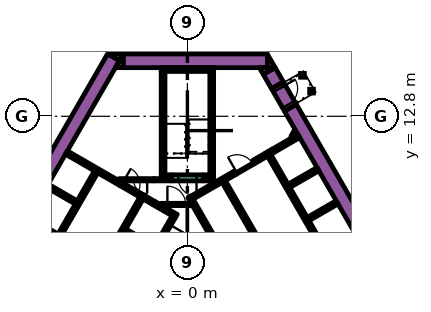
"""IFC4 building model, lengths in metres.
Left out: names, types, materials, properties, quantities, classifications, styles, units other than length and angle.
Written with IfcOpenShell. Run it as: python <this file> out.ifc"""

import sys

from ifc_helpers import new_model, si_unit, direction, frame, frame_2d, origin, origin_2d, place, context, subcontext, project, spatial, polyline, rectangle, outline, extrude, element, fill, save


model = new_model("IFC4")
c1 = context("Model", 3, precision=1e-05, world=origin(), true_north=direction((0.0, 1.0)))
c2 = subcontext(c1, "Body", "Model", "MODEL_VIEW")
j1 = project(units=[si_unit("LENGTHUNIT", "METRE"), si_unit("PLANEANGLEUNIT", "RADIAN")], contexts=[c1])
p1 = place(None, origin())
s1 = spatial("IfcSite", under=j1, at=p1, CompositionType="ELEMENT")
p2 = place(p1, origin())
s2 = spatial("IfcBuilding", under=s1, at=p2, CompositionType="ELEMENT")
p3 = place(p2, frame((0.0, 0.0, 6.0)))
s3 = spatial("IfcBuildingStorey", under=s2, at=p3, CompositionType="ELEMENT", Elevation=6.0)
p4 = place(p3, frame((6.776, 13.364, 0.0), z_axis=(0.0, 0.0, 1.0), x_axis=(0.500004177138, -0.8660229921, 0.0)))
e1 = element("IfcWall", 1, at=p4, inside=s3, PredefinedType="SOLIDWALL", context=c2, shape_type="SweptSolid", body=[
    extrude(rectangle(XDim=20.204, YDim=0.9, at=frame_2d((10.102, 0.0))), origin(), (0.0, 0.0, 1.0), 5.4),
])
p5 = place(p3, frame((-15.36, -1.503, 0.0), z_axis=(0.0, 0.0, 1.0), x_axis=(0.50000389221, 0.866023156604, 0.0)))
e2 = element("IfcWall", 2, at=p5, inside=s3, PredefinedType="SOLIDWALL", context=c2, shape_type="SweptSolid", body=[
    extrude(rectangle(XDim=21.0, YDim=0.9, at=frame_2d((10.5, 0.0))), origin(), (0.0, 0.0, 1.0), 5.4),
])
p6 = place(p3, origin())
e3 = element("IfcWall", 3, at=p6, inside=s3, PredefinedType="SOLIDWALL", context=c2, shape_type="SweptSolid", body=[
    extrude(outline(polyline([(-4.215, 16.9), (-4.469, 16.46), (-5.231, 16.9), (-4.215, 16.9)])), origin(), (0.0, 0.0, 1.0), 5.4),
])
p7 = place(p3, frame((-4.224, 16.45, 0.0), z_axis=(0.0, 0.0, 1.0), x_axis=(1.0, 0.0, 0.0)))
e4 = element("IfcWall", 4, at=p7, inside=s3, PredefinedType="SOLIDWALL", context=c2, shape_type="SweptSolid", body=[
    extrude(rectangle(XDim=9.488, YDim=0.9, at=frame_2d((4.744, 0.0))), origin(), (0.0, 0.0, 1.0), 5.4),
])
e5 = element("IfcWall", 5, at=p6, inside=s3, PredefinedType="SOLIDWALL", context=c2, shape_type="SweptSolid", body=[
    extrude(outline(polyline([(5.265, 16.0), (5.265, 16.88), (5.773, 16.0), (5.265, 16.0)])), origin(), (0.0, 0.0, 1.0), 5.4),
])
e6 = element("IfcWall", 6, at=p6, inside=s3, PredefinedType="SOLIDWALL", context=c2, shape_type="SweptSolid", body=[
    extrude(outline(polyline([(-4.734, 16.0), (-4.226, 16.88), (-4.226, 16.0), (-4.734, 16.0)])), origin(), (0.0, 0.0, 1.0), 5.4),
])
p8 = place(p3, frame((5.926, 14.836, 0.0), z_axis=(0.0, 0.0, 1.0), x_axis=(-0.500076735116, 0.865981096212, 0.0)))
e7 = element("IfcWall", 7, at=p8, inside=s3, PredefinedType="SOLIDWALL", context=c2, shape_type="SweptSolid", body=[
    extrude(rectangle(XDim=1.094, YDim=0.9, at=frame_2d((0.547, 0.0))), origin(), (0.0, 0.0, 1.0), 5.4),
])
e8 = element("IfcWall", 8, at=p6, inside=s3, PredefinedType="SOLIDWALL", context=c2, shape_type="SweptSolid", body=[
    extrude(outline(polyline([(4.734, 16.0), (5.75, 16.0), (4.988, 15.56), (4.734, 16.0)])), origin(), (0.0, 0.0, 1.0), 5.4),
])
p9 = place(p3, frame((-1.725, 15.875, 0.0), z_axis=(0.0, 0.0, 1.0), x_axis=(1.0, 0.0, 0.0)))
e9 = element("IfcWall", 9, at=p9, inside=s3, PredefinedType="SOLIDWALL", context=c2, shape_type="SweptSolid", body=[
    extrude(rectangle(XDim=3.45, YDim=0.25, at=frame_2d((1.725, 0.0))), origin(), (0.0, 0.0, 1.0), 5.4),
])
p10 = place(p3, frame((1.6, 8.95, 0.0), z_axis=(0.0, 0.0, 1.0), x_axis=(0.0, 1.0, 0.0)))
e10 = element("IfcWall", 10, at=p10, inside=s3, PredefinedType="SOLIDWALL", context=c2, shape_type="SweptSolid", body=[
    extrude(rectangle(XDim=6.8, YDim=0.25, at=frame_2d((3.4, 0.0))), origin(), (0.0, 0.0, 1.0), 5.4),
])
p11 = place(p3, frame((1.05, 8.825, 0.0), z_axis=(0.0, 0.0, 1.0), x_axis=(1.0, 0.0, 0.0)))
e11 = element("IfcWall", 11, at=p11, inside=s3, PredefinedType="SOLIDWALL", context=c2, shape_type="SweptSolid", body=[
    extrude(rectangle(XDim=0.675, YDim=0.25, at=frame_2d((0.337, 0.0))), origin(), (0.0, 0.0, 1.0), 5.4),
])
p12 = place(p3, frame((-1.6, 8.7, 0.0), z_axis=(0.0, 0.0, 1.0), x_axis=(0.0, 1.0, 0.0)))
e12 = element("IfcWall", 12, at=p12, inside=s3, PredefinedType="SOLIDWALL", context=c2, shape_type="SweptSolid", body=[
    extrude(rectangle(XDim=7.05, YDim=0.25, at=frame_2d((3.525, 0.0))), origin(), (0.0, 0.0, 1.0), 5.4),
])
p13 = place(p3, frame((-1.475, 8.825, 0.0), z_axis=(0.0, 0.0, 1.0), x_axis=(1.0, 0.0, 0.0)))
e13 = element("IfcWall", 13, at=p13, inside=s3, PredefinedType="SOLIDWALL", context=c2, shape_type="SweptSolid", body=[
    extrude(rectangle(XDim=0.425, YDim=0.25, at=frame_2d((0.212, 0.0))), origin(), (0.0, 0.0, 1.0), 5.4),
])
p14 = place(p3, frame((11.678, -0.677, 0.0), z_axis=(0.0, 0.0, 1.0), x_axis=(-0.500003135297, 0.866023593612, 0.0)))
e14 = element("IfcWall", 14, at=p14, inside=s3, PredefinedType="SOLIDWALL", context=c2, shape_type="SweptSolid", body=[
    extrude(rectangle(XDim=12.85, YDim=0.25, at=frame_2d((6.425, 0.0))), origin(), (0.0, 0.0, 1.0), 5.4),
])
e15 = element("IfcWall", 15, at=p6, inside=s3, PredefinedType="SOLIDWALL", context=c2, shape_type="SweptSolid", body=[
    extrude(outline(polyline([(6.552, -3.348), (6.677, -3.564), (6.46, -3.689), (4.897, -0.981), (0.332, 6.925), (0.335, 6.925), (0.335, 6.925), (0.335, 6.925), (0.335, 7.075), (0.335, 7.075), (0.335, 7.075), (0.245, 7.075), (0.079, 7.363), (0.035, 7.439), (0.252, 7.564), (0.377, 7.348), (6.552, -3.348)])), origin(), (0.0, 0.0, 1.0), 5.4),
])
p15 = place(p3, frame((4.358, 9.791, 0.0), z_axis=(0.0, 0.0, 1.0), x_axis=(0.866100000774, 0.49987077196, 0.0)))
e16 = element("IfcWall", 16, at=p15, inside=s3, PredefinedType="SOLIDWALL", context=c2, shape_type="SweptSolid", body=[
    extrude(rectangle(XDim=0.95, YDim=0.25, at=frame_2d((0.475, 0.0))), origin(), (0.0, 0.0, 1.0), 5.4),
])
p16 = place(p3, frame((0.314, 7.456, 0.0), z_axis=(0.0, 0.0, 1.0), x_axis=(0.866013897511, 0.50001992892, 0.0)))
e17 = element("IfcWall", 17, at=p16, inside=s3, PredefinedType="SOLIDWALL", context=c2, shape_type="SweptSolid", body=[
    extrude(rectangle(XDim=3.268, YDim=0.25, at=frame_2d((1.634, 0.0))), origin(), (0.0, 0.0, 1.0), 5.4),
])
p17 = place(p3, frame((5.469, 10.577, 0.0), z_axis=(0.0, 0.0, 1.0), x_axis=(0.499919672301, -0.866071776036, 0.0)))
e18 = element("IfcWall", 18, at=p17, inside=s3, PredefinedType="SOLIDWALL", context=c2, shape_type="SweptSolid", body=[
    extrude(rectangle(XDim=0.25, YDim=0.25, at=frame_2d((0.125, 0.0))), origin(), (0.0, 0.0, 1.0), 5.4),
])
p18 = place(p3, frame((5.64, 10.531, 0.0), z_axis=(0.0, 0.0, 1.0), x_axis=(0.866000020948, 0.500043961785, 0.0)))
e19 = element("IfcWall", 19, at=p18, inside=s3, PredefinedType="SOLIDWALL", context=c2, shape_type="SweptSolid", body=[
    extrude(rectangle(XDim=1.95, YDim=0.25, at=frame_2d((0.975, 0.0))), origin(), (0.0, 0.0, 1.0), 5.4),
])
for number, where, z_axis, x_axis in (
    (20, (8.589, 9.323, 0.0), (0.0, 0.0, 1.0), (-0.866, -0.5, 0.0)),
    (21, (7.944, 6.041, 0.0), (0.0, 0.0, 1.0), (0.866, 0.5, 0.0)),
):
    element("IfcWall", number, at=place(p3, frame(where, z_axis=z_axis, x_axis=x_axis)), inside=s3, PredefinedType="SOLIDWALL", context=c2, shape_type="SweptSolid", body=[
        extrude(rectangle(XDim=2.2, YDim=0.25, at=frame_2d((1.1, 0.0))), origin(), (0.0, 0.0, 1.0), 5.4),
    ])
p19 = place(p3, frame((-8.06, -1.311, 0.0), z_axis=(0.0, 0.0, 1.0), x_axis=(0.50000273126, 0.866023826885, 0.0)))
e22 = element("IfcWall", 22, at=p19, inside=s3, PredefinedType="SOLIDWALL", context=c2, shape_type="SweptSolid", body=[
    extrude(rectangle(XDim=10.33, YDim=0.25, at=frame_2d((5.165, 0.0))), origin(), (0.0, 0.0, 1.0), 5.4),
])
p20 = place(p3, frame((-1.819, 6.87, 0.0), z_axis=(0.0, 0.0, 1.0), x_axis=(-0.866294599386, 0.499533449405, 0.0)))
e23 = element("IfcWall", 23, at=p20, inside=s3, PredefinedType="SOLIDWALL", context=c2, shape_type="SweptSolid", body=[
    extrude(rectangle(XDim=0.41, YDim=0.25, at=frame_2d((0.205, 0.0))), origin(), (0.0, 0.0, 1.0), 5.4),
])
p21 = place(p3, frame((-2.849, 7.465, 0.0), z_axis=(0.0, 0.0, 1.0), x_axis=(0.865955664968, -0.500120771724, 0.0)))
e24 = element("IfcWall", 24, at=p21, inside=s3, PredefinedType="SOLIDWALL", context=c2, shape_type="SweptSolid", body=[
    extrude(rectangle(XDim=0.778, YDim=0.25, at=frame_2d((0.389, 0.0))), origin(), (0.0, 0.0, 1.0), 5.4),
])
p22 = place(p3, frame((-0.728, 6.24, 0.0), z_axis=(0.0, 0.0, 1.0), x_axis=(-0.866002680491, 0.500039355833, 0.0)))
e25 = element("IfcWall", 25, at=p22, inside=s3, PredefinedType="SOLIDWALL", context=c2, shape_type="SweptSolid", body=[
    extrude(rectangle(XDim=1.178, YDim=0.25, at=frame_2d((0.589, 0.0))), origin(), (0.0, 0.0, 1.0), 5.4),
])
p23 = place(p3, frame((-2.204, 4.182, 0.0), z_axis=(0.0, 0.0, 1.0), x_axis=(-0.866008176907, 0.50002983664, 0.0)))
e26 = element("IfcWall", 26, at=p23, inside=s3, PredefinedType="SOLIDWALL", context=c2, shape_type="SweptSolid", body=[
    extrude(rectangle(XDim=2.2, YDim=0.25, at=frame_2d((1.1, 0.0))), origin(), (0.0, 0.0, 1.0), 5.4),
])
e27 = element("IfcWall", 27, at=p6, inside=s3, PredefinedType="SOLIDWALL", context=c2, shape_type="SweptSolid", body=[
    extrude(outline(polyline([(-3.128, 7.481), (-3.259, 7.557), (-3.134, 7.773), (-3.003, 7.698), (-3.128, 7.481)])), origin(), (0.0, 0.0, 1.0), 5.4),
])
for number, where, z_axis, x_axis in (
    (28, (-8.574, 4.95, 0.0), (0.0, 0.0, 1.0), (-0.866, 0.5, 0.0)),
    (29, (-7.314, 7.132, 0.0), (0.0, 0.0, 1.0), (-0.866, 0.5, 0.0)),
):
    element("IfcWall", number, at=place(p3, frame(where, z_axis=z_axis, x_axis=x_axis)), inside=s3, PredefinedType="SOLIDWALL", context=c2, shape_type="SweptSolid", body=[
        extrude(rectangle(XDim=2.2, YDim=0.25, at=frame_2d((1.1, 0.0))), origin(), (0.0, 0.0, 1.0), 5.4),
    ])
p24 = place(p3, frame((-7.959, 10.415, 0.0), z_axis=(0.0, 0.0, 1.0), x_axis=(0.866020958405, -0.500007699544, 0.0)))
e30 = element("IfcWall", 30, at=p24, inside=s3, PredefinedType="SOLIDWALL", context=c2, shape_type="SweptSolid", body=[
    extrude(rectangle(XDim=4.1, YDim=0.25, at=frame_2d((2.05, 0.0))), origin(), (0.0, 0.0, 1.0), 5.4),
])
p25 = place(p3, frame((-3.997, 8.625, 0.0), z_axis=(0.0, 0.0, 1.0), x_axis=(-1.0, 0.0, 0.0)))
e31 = element("IfcWall", 31, at=p25, inside=s3, PredefinedType="PARTITIONING", context=c2, shape_type="SweptSolid", body=[
    extrude(rectangle(XDim=0.502, YDim=0.15, at=frame_2d((0.251, 0.0))), origin(), (0.0, 0.0, 1.0), 4.5),
])
p26 = place(p3, frame((-2.196, 8.625, 0.0), z_axis=(0.0, 0.0, 1.0), x_axis=(1.0, 0.0, 0.0)))
e32 = element("IfcWall", 32, at=p26, inside=s3, PredefinedType="PARTITIONING", context=c2, shape_type="SweptSolid", body=[
    extrude(rectangle(XDim=1.146, YDim=0.15, at=frame_2d((0.573, 0.0))), origin(), (0.0, 0.0, 1.0), 4.5),
])
p27 = place(p3, frame((1.05, 8.625, 0.0), z_axis=(0.0, 0.0, 1.0), x_axis=(1.0, 0.0, 0.0)))
e33 = element("IfcWall", 33, at=p27, inside=s3, PredefinedType="PARTITIONING", context=c2, shape_type="SweptSolid", body=[
    extrude(rectangle(XDim=0.514, YDim=0.15, at=frame_2d((0.257, 0.0))), origin(), (0.0, 0.0, 1.0), 4.5),
])
p28 = place(p3, frame((6.872, 11.45, 0.0), z_axis=(0.0, 0.0, 1.0), x_axis=(0.499846793097, 0.866113839764, 0.0)))
e34 = element("IfcWall", 34, at=p28, inside=s3, PredefinedType="PARTITIONING", context=c2, shape_type="SweptSolid", body=[
    extrude(rectangle(XDim=0.453, YDim=0.15, at=frame_2d((0.227, 0.0))), origin(), (0.0, 0.0, 1.0), 4.5),
])
p29 = place(p3, frame((7.131, 11.6, 0.0), z_axis=(0.0, 0.0, 1.0), x_axis=(0.498600033135, 0.866832167699, 0.0)))
e35 = element("IfcWall", 35, at=p29, inside=s3, PredefinedType="PARTITIONING", context=c2, shape_type="SweptSolid", body=[
    extrude(rectangle(XDim=0.107, YDim=0.15, at=frame_2d((0.053, 0.0))), origin(), (0.0, 0.0, 1.0), 4.5),
])
p30 = place(p3, frame((8.565, -2.185, 0.0), z_axis=(0.0, 0.0, 1.0), x_axis=(-0.499997954832, 0.866026584559, 0.0)))
e36 = element("IfcWall", 36, at=p30, inside=s3, PredefinedType="SOLIDWALL", context=c2, shape_type="SweptSolid", body=[
    extrude(rectangle(XDim=12.35, YDim=0.25, at=frame_2d((6.175, 0.0))), origin(), (0.0, 0.0, 1.0), 5.4),
])
p31 = place(p30, frame((5.725, 0.0, 0.0)))
e37 = element("IfcOpeningElement", 37, at=p31, cuts=e36, PredefinedType="OPENING", context=c2, shape_type="SweptSolid", body=[
    extrude(rectangle(XDim=0.9, YDim=2.1, at=frame_2d((0.45, 1.05))), frame((0.0, 0.135, 0.0), z_axis=(0.0, -1.0, 0.0), x_axis=(1.0, 0.0, 0.0)), (0.0, 0.0, 1.0), 0.27),
])
p32 = place(p3, frame((-6.008, 9.144, 0.0), z_axis=(0.0, 0.0, 1.0), x_axis=(-0.500006956611, -0.866021387346, 0.0)))
e38 = element("IfcWall", 38, at=p32, inside=s3, PredefinedType="SOLIDWALL", context=c2, shape_type="SweptSolid", body=[
    extrude(rectangle(XDim=9.83, YDim=0.25, at=frame_2d((4.915, 0.0))), origin(), (0.0, 0.0, 1.0), 5.4),
])
p33 = place(p32, frame((6.985, 0.0, 0.0)))
e39 = element("IfcOpeningElement", 39, at=p33, cuts=e38, PredefinedType="OPENING", context=c2, shape_type="SweptSolid", body=[
    extrude(rectangle(XDim=0.9, YDim=2.1, at=frame_2d((0.45, 1.05))), frame((0.0, 0.135, 0.0), z_axis=(0.0, -1.0, 0.0), x_axis=(1.0, 0.0, 0.0)), (0.0, 0.0, 1.0), 0.27),
])
p34 = place(p3, frame((-0.898, 6.194, 0.0), z_axis=(0.0, 0.0, 1.0), x_axis=(-0.499996202215, -0.866027596426, 0.0)))
e40 = element("IfcWall", 40, at=p34, inside=s3, PredefinedType="SOLIDWALL", context=c2, shape_type="SweptSolid", body=[
    extrude(rectangle(XDim=9.83, YDim=0.25, at=frame_2d((4.915, 0.0))), origin(), (0.0, 0.0, 1.0), 5.4),
])
p35 = place(p34, frame((0.585, 0.0, 0.0)))
e41 = element("IfcOpeningElement", 41, at=p35, cuts=e40, PredefinedType="OPENING", context=c2, shape_type="SweptSolid", body=[
    extrude(rectangle(XDim=1.1, YDim=2.1, at=frame_2d((0.55, 1.05))), frame((0.0, 0.135, 0.0), z_axis=(0.0, -1.0, 0.0), x_axis=(1.0, 0.0, 0.0)), (0.0, 0.0, 1.0), 0.27),
])
p36 = place(p34, frame((3.105, 0.0, 0.0)))
e42 = element("IfcOpeningElement", 42, at=p36, cuts=e40, PredefinedType="OPENING", context=c2, shape_type="SweptSolid", body=[
    extrude(rectangle(XDim=1.1, YDim=2.1, at=frame_2d((0.55, 1.05))), frame((0.0, 0.135, 0.0), z_axis=(0.0, -1.0, 0.0), x_axis=(1.0, 0.0, 0.0)), (0.0, 0.0, 1.0), 0.27),
])
p37 = place(p34, frame((5.625, 0.0, 0.0)))
e43 = element("IfcOpeningElement", 43, at=p37, cuts=e40, PredefinedType="OPENING", context=c2, shape_type="SweptSolid", body=[
    extrude(rectangle(XDim=1.1, YDim=2.1, at=frame_2d((0.55, 1.05))), frame((0.0, 0.135, 0.0), z_axis=(0.0, -1.0, 0.0), x_axis=(1.0, 0.0, 0.0)), (0.0, 0.0, 1.0), 0.27),
])
p38 = place(p34, frame((8.145, 0.0, 0.0)))
e44 = element("IfcOpeningElement", 44, at=p38, cuts=e40, PredefinedType="OPENING", context=c2, shape_type="SweptSolid", body=[
    extrude(rectangle(XDim=1.1, YDim=2.1, at=frame_2d((0.55, 1.05))), frame((0.0, 0.135, 0.0), z_axis=(0.0, -1.0, 0.0), x_axis=(1.0, 0.0, 0.0)), (0.0, 0.0, 1.0), 0.27),
])
p39 = place(p3, frame((1.05, 8.75, 0.0), z_axis=(0.0, 0.0, 1.0), x_axis=(-1.0, 0.0, 0.0)))
e45 = element("IfcWall", 45, at=p39, inside=s3, PredefinedType="SOLIDWALL", context=c2, shape_type="SweptSolid", body=[
    extrude(rectangle(XDim=2.1, YDim=0.4, at=frame_2d((1.05, 0.0))), origin(), (0.0, 0.0, 1.0), 5.4),
])
p40 = place(p39, frame((0.45, 0.0, 0.0)))
e46 = element("IfcOpeningElement", 46, at=p40, cuts=e45, PredefinedType="OPENING", context=c2, shape_type="SweptSolid", body=[
    extrude(rectangle(XDim=1.2, YDim=2.1, at=frame_2d((0.6, 1.05))), frame((0.0, 0.21, 0.0), z_axis=(0.0, -1.0, 0.0), x_axis=(1.0, 0.0, 0.0)), (0.0, 0.0, 1.0), 0.42),
])
p41 = place(p3, frame((-2.196, 8.625, 0.0), z_axis=(0.0, 0.0, 1.0), x_axis=(-1.0, 0.0, 0.0)))
e47 = element("IfcWall", 47, at=p41, inside=s3, PredefinedType="PARTITIONING", context=c2, shape_type="SweptSolid", body=[
    extrude(rectangle(XDim=1.8, YDim=0.15, at=frame_2d((0.9, 0.0))), origin(), (0.0, 0.0, 1.0), 4.5),
])
p42 = place(p41, frame((0.45, 0.0, 0.0)))
e48 = element("IfcOpeningElement", 48, at=p42, cuts=e47, PredefinedType="OPENING", context=c2, shape_type="SweptSolid", body=[
    extrude(rectangle(XDim=0.9, YDim=2.1, at=frame_2d((0.45, 1.05))), frame((0.0, 0.085, 0.0), z_axis=(0.0, -1.0, 0.0), x_axis=(1.0, 0.0, 0.0)), (0.0, 0.0, 1.0), 0.17),
])
p43 = place(p3, frame((-1.765, 7.0, 0.0), z_axis=(0.0, 0.0, 1.0), x_axis=(1.0, 0.0, 0.0)))
e49 = element("IfcWall", 49, at=p43, inside=s3, PredefinedType="PARTITIONING", context=c2, shape_type="SweptSolid", body=[
    extrude(rectangle(XDim=2.1, YDim=0.15, at=frame_2d((1.05, 0.0))), origin(), (0.0, 0.0, 1.0), 4.5),
])
p44 = place(p43, frame((0.45, 0.0, 0.0)))
e50 = element("IfcOpeningElement", 50, at=p44, cuts=e49, PredefinedType="OPENING", context=c2, shape_type="SweptSolid", body=[
    extrude(rectangle(XDim=1.2, YDim=2.1, at=frame_2d((0.6, 1.05))), frame((0.0, 0.085, 0.0), z_axis=(0.0, -1.0, 0.0), x_axis=(1.0, 0.0, 0.0)), (0.0, 0.0, 1.0), 0.17),
])
p45 = place(p3, frame((3.183, 9.02, 0.0), z_axis=(0.0, 0.0, 1.0), x_axis=(0.866034573852, 0.49998411664, 0.0)))
e51 = element("IfcWall", 51, at=p45, inside=s3, PredefinedType="PARTITIONING", context=c2, shape_type="SweptSolid", body=[
    extrude(rectangle(XDim=1.4, YDim=0.09, at=frame_2d((0.7, 0.0))), origin(), (0.0, 0.0, 1.0), 4.5),
])
p46 = place(p45, frame((0.1, 0.0, 0.0)))
e52 = element("IfcOpeningElement", 52, at=p46, cuts=e51, PredefinedType="OPENING", context=c2, shape_type="SweptSolid", body=[
    extrude(rectangle(XDim=1.2, YDim=2.1, at=frame_2d((0.6, 1.05))), frame((0.0, 0.055, 0.0), z_axis=(0.0, -1.0, 0.0), x_axis=(1.0, 0.0, 0.0)), (0.0, 0.0, 1.0), 0.11),
])
p47 = place(p3, frame((-4.409, 8.365, 0.0), z_axis=(0.0, 0.0, 1.0), x_axis=(0.866034573852, -0.49998411664, 0.0)))
e53 = element("IfcWall", 53, at=p47, inside=s3, PredefinedType="SOLIDWALL", context=c2, shape_type="SweptSolid", body=[
    extrude(rectangle(XDim=1.4, YDim=0.25, at=frame_2d((0.7, 0.0))), origin(), (0.0, 0.0, 1.0), 5.4),
])
p48 = place(p47, frame((0.1, 0.0, 0.0)))
e54 = element("IfcOpeningElement", 54, at=p48, cuts=e53, PredefinedType="OPENING", context=c2, shape_type="SweptSolid", body=[
    extrude(rectangle(XDim=1.2, YDim=2.1, at=frame_2d((0.6, 1.05))), frame((0.0, 0.135, 0.0), z_axis=(0.0, -1.0, 0.0), x_axis=(1.0, 0.0, 0.0)), (0.0, 0.0, 1.0), 0.27),
])
p49 = place(p3, frame((5.926, 14.836, 0.0), z_axis=(0.0, 0.0, 1.0), x_axis=(0.500062241894, -0.865989465428, 0.0)))
e55 = element("IfcWall", 55, at=p49, inside=s3, PredefinedType="SOLIDWALL", context=c2, shape_type="SweptSolid", body=[
    extrude(rectangle(XDim=1.7, YDim=0.9, at=frame_2d((0.85, 0.0))), origin(), (0.0, 0.0, 1.0), 5.4),
])
p50 = place(p49, frame((0.25, 0.0, 0.0)))
e56 = element("IfcOpeningElement", 56, at=p50, cuts=e55, PredefinedType="OPENING", context=c2, shape_type="SweptSolid", body=[
    extrude(rectangle(XDim=1.2, YDim=2.1, at=frame_2d((0.6, 1.05))), frame((0.0, 0.46, 0.0), z_axis=(0.0, -1.0, 0.0), x_axis=(1.0, 0.0, 0.0)), (0.0, 0.0, 1.0), 0.92),
])
for number, where, z_axis, x_axis in (
    (57, (8.167, 14.455, 0.0), (0.0, 0.0, 1.0), (1.0, 0.0, 0.0)),
    (58, (7.566, 15.495, 0.0), (0.0, 0.0, 1.0), (1.0, 0.0, 0.0)),
):
    element("IfcColumn", number, at=place(p3, frame(where, z_axis=z_axis, x_axis=x_axis)), inside=s3, PredefinedType="COLUMN", context=c2, shape_type="SweptSolid", body=[
        extrude(rectangle(XDim=0.25, YDim=0.25, at=origin_2d()), origin(), (0.0, 0.0, 1.0), 5.2),
    ])
p51 = place(p35, origin())
e59 = element("IfcDoor", 59, at=p51, inside=s3, OperationType="DOUBLE_DOOR_SLIDING", PredefinedType="DOOR", context=c2, shape_type="SweptSolid", body=[
    extrude(rectangle(XDim=1.1, YDim=2.1, at=frame_2d((0.55, 1.05))), frame((0.0, 0.025, 0.0), z_axis=(0.0, -1.0, 0.0), x_axis=(1.0, 0.0, 0.0)), (0.0, 0.0, 1.0), 0.05),
])
fill(e41, e59)
p52 = place(p40, origin())
e60 = element("IfcDoor", 60, at=p52, inside=s3, OperationType="SINGLE_SWING_LEFT", PredefinedType="DOOR", context=c2, shape_type="SweptSolid", body=[
    extrude(rectangle(XDim=1.2, YDim=2.1, at=frame_2d((0.6, 1.05))), frame((0.0, 0.025, 0.0), z_axis=(0.0, -1.0, 0.0), x_axis=(1.0, 0.0, 0.0)), (0.0, 0.0, 1.0), 0.05),
])
fill(e46, e60)
p53 = place(p42, origin())
e61 = element("IfcDoor", 61, at=p53, inside=s3, OperationType="SINGLE_SWING_LEFT", PredefinedType="DOOR", context=c2, shape_type="SweptSolid", body=[
    extrude(rectangle(XDim=0.9, YDim=2.1, at=frame_2d((0.45, 1.05))), frame((0.0, 0.025, 0.0), z_axis=(0.0, -1.0, 0.0), x_axis=(1.0, 0.0, 0.0)), (0.0, 0.0, 1.0), 0.05),
])
fill(e48, e61)
p54 = place(p44, origin())
e62 = element("IfcDoor", 62, at=p54, inside=s3, OperationType="SINGLE_SWING_LEFT", PredefinedType="DOOR", context=c2, shape_type="SweptSolid", body=[
    extrude(rectangle(XDim=1.2, YDim=2.1, at=frame_2d((0.6, 1.05))), frame((0.0, 0.025, 0.0), z_axis=(0.0, -1.0, 0.0), x_axis=(1.0, 0.0, 0.0)), (0.0, 0.0, 1.0), 0.05),
])
fill(e50, e62)
p55 = place(p46, origin())
e63 = element("IfcDoor", 63, at=p55, inside=s3, OperationType="SINGLE_SWING_LEFT", PredefinedType="DOOR", context=c2, shape_type="SweptSolid", body=[
    extrude(rectangle(XDim=1.2, YDim=2.1, at=frame_2d((0.6, 1.05))), frame((0.0, 0.025, 0.0), z_axis=(0.0, -1.0, 0.0), x_axis=(1.0, 0.0, 0.0)), (0.0, 0.0, 1.0), 0.05),
])
fill(e52, e63)
p56 = place(p48, origin())
e64 = element("IfcDoor", 64, at=p56, inside=s3, OperationType="SINGLE_SWING_LEFT", PredefinedType="DOOR", context=c2, shape_type="SweptSolid", body=[
    extrude(rectangle(XDim=1.2, YDim=2.1, at=frame_2d((0.6, 1.05))), frame((0.0, 0.025, 0.0), z_axis=(0.0, -1.0, 0.0), x_axis=(1.0, 0.0, 0.0)), (0.0, 0.0, 1.0), 0.05),
])
fill(e54, e64)
p57 = place(p50, origin())
e65 = element("IfcDoor", 65, at=p57, inside=s3, OperationType="SINGLE_SWING_LEFT", PredefinedType="DOOR", context=c2, shape_type="SweptSolid", body=[
    extrude(rectangle(XDim=1.2, YDim=2.1, at=frame_2d((0.6, 1.05))), frame((0.0, 0.025, 0.0), z_axis=(0.0, -1.0, 0.0), x_axis=(1.0, 0.0, 0.0)), (0.0, 0.0, 1.0), 0.05),
])
fill(e56, e65)
save(model, sys.argv[1])
